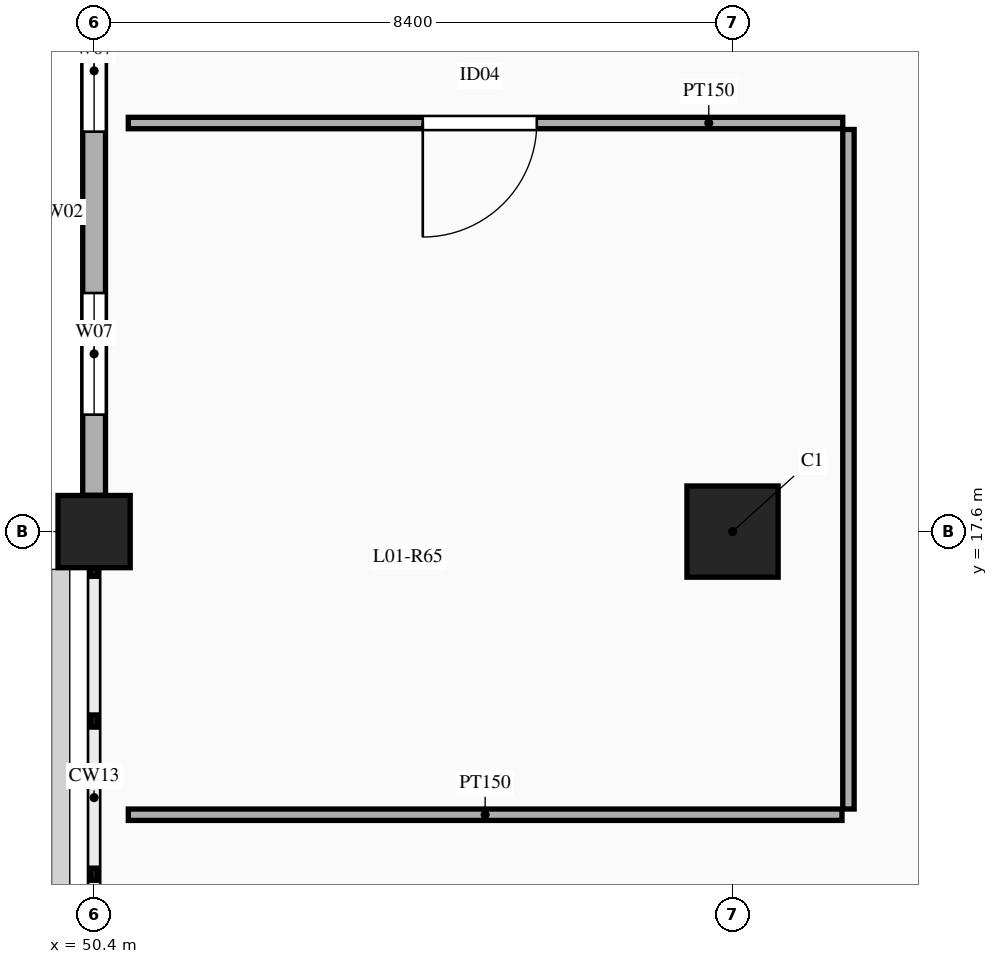
"""IFC4 building model, lengths in metres.
Left out: names, types, materials, properties, quantities, classifications, styles, units other than length and angle.
Written with IfcOpenShell. Run it as: python <this file> out.ifc"""

import sys

from ifc_helpers import new_model, si_unit, direction, frame, frame_2d, origin, origin_2d, place, context, subcontext, project, spatial, rectangle, extrude, element, fill, save


model = new_model("IFC4")
c1 = context("Model", 3, precision=1e-05, world=origin(), true_north=direction((0.0, 1.0)))
c2 = subcontext(c1, "Body", "Model", "MODEL_VIEW")
j1 = project(units=[si_unit("LENGTHUNIT", "METRE"), si_unit("PLANEANGLEUNIT", "RADIAN")], contexts=[c1])
p1 = place(None, origin())
s1 = spatial("IfcSite", under=j1, at=p1, CompositionType="ELEMENT")
p2 = place(p1, origin())
s2 = spatial("IfcBuilding", under=s1, at=p2, CompositionType="ELEMENT")
p3 = place(p2, frame((0.0, 0.0, 5.4)))
s3 = spatial("IfcBuildingStorey", under=s2, at=p3, CompositionType="ELEMENT", Elevation=5.4)
p4 = place(p3, frame((50.4, 17.6, 0.0), z_axis=(0.0, 0.0, 1.0), x_axis=(1.0, 0.0, 0.0)))
e1 = element("IfcColumn", 1, at=p4, inside=s3, PredefinedType="COLUMN", context=c2, shape_type="SweptSolid", body=[
    extrude(rectangle(XDim=0.95, YDim=0.95, at=origin_2d()), origin(), (0.0, 0.0, 1.0), 4.8),
])
p5 = place(p3, frame((58.8, 17.6, 0.0), z_axis=(0.0, 0.0, 1.0), x_axis=(1.0, 0.0, 0.0)))
e2 = element("IfcColumn", 2, at=p5, inside=s3, PredefinedType="COLUMN", context=c2, shape_type="SweptSolid", body=[
    extrude(rectangle(XDim=1.2, YDim=1.2, at=origin_2d()), origin(), (0.0, 0.0, 1.0), 4.8),
])
p6 = place(p3, frame((50.4, 18.077, 0.0), z_axis=(0.0, 0.0, 1.0), x_axis=(0.0, 1.0, 0.0)))
e3 = element("IfcWall", 3, at=p6, inside=s3, PredefinedType="SOLIDWALL", context=c2, shape_type="SweptSolid", body=[
    extrude(rectangle(XDim=7.446, YDim=0.3, at=frame_2d((3.723, 0.0))), origin(), (0.0, 0.0, 1.0), 3.85),
])
p7 = place(p6, frame((1.062, 0.0, 0.9)))
e4 = element("IfcOpeningElement", 4, at=p7, cuts=e3, PredefinedType="OPENING", context=c2, shape_type="SweptSolid", body=[
    extrude(rectangle(XDim=1.6, YDim=2.1, at=frame_2d((0.8, 1.05))), frame((0.0, 0.16, 0.0), z_axis=(0.0, -1.0, 0.0), x_axis=(1.0, 0.0, 0.0)), (0.0, 0.0, 1.0), 0.32),
])
p8 = place(p6, frame((4.784, 0.0, 0.9)))
e5 = element("IfcOpeningElement", 5, at=p8, cuts=e3, PredefinedType="OPENING", context=c2, shape_type="SweptSolid", body=[
    extrude(rectangle(XDim=1.6, YDim=2.1, at=frame_2d((0.8, 1.05))), frame((0.0, 0.16, 0.0), z_axis=(0.0, -1.0, 0.0), x_axis=(1.0, 0.0, 0.0)), (0.0, 0.0, 1.0), 0.32),
])
p9 = place(p3, frame((50.85, 22.975, 0.0), z_axis=(0.0, 0.0, 1.0), x_axis=(1.0, 0.0, 0.0)))
e6 = element("IfcWall", 6, at=p9, inside=s3, PredefinedType="PARTITIONING", context=c2, shape_type="SweptSolid", body=[
    extrude(rectangle(XDim=9.4, YDim=0.15, at=frame_2d((4.7, 0.0))), origin(), (0.0, 0.0, 1.0), 2.95),
])
p10 = place(p9, frame((3.875, 0.0, 0.0)))
e7 = element("IfcOpeningElement", 7, at=p10, cuts=e6, PredefinedType="OPENING", context=c2, shape_type="SweptSolid", body=[
    extrude(rectangle(XDim=1.5, YDim=2.3, at=frame_2d((0.75, 1.15))), frame((0.0, 0.085, 0.0), z_axis=(0.0, -1.0, 0.0), x_axis=(1.0, 0.0, 0.0)), (0.0, 0.0, 1.0), 0.17),
])
p11 = place(p3, frame((60.325, 13.95, 0.0), z_axis=(0.0, 0.0, 1.0), x_axis=(0.0, 1.0, 0.0)))
e8 = element("IfcWall", 8, at=p11, inside=s3, PredefinedType="PARTITIONING", context=c2, shape_type="SweptSolid", body=[
    extrude(rectangle(XDim=8.94, YDim=0.15, at=frame_2d((4.47, 0.0))), origin(), (0.0, 0.0, 1.0), 2.95),
])
p12 = place(p3, frame((50.85, 13.875, 0.0), z_axis=(0.0, 0.0, 1.0), x_axis=(1.0, 0.0, 0.0)))
e9 = element("IfcWall", 9, at=p12, inside=s3, PredefinedType="PARTITIONING", context=c2, shape_type="SweptSolid", body=[
    extrude(rectangle(XDim=9.39, YDim=0.15, at=frame_2d((4.695, 0.0))), origin(), (0.0, 0.0, 1.0), 2.95),
])
p13 = place(p7, origin())
e10 = element("IfcWindow", 10, at=p13, inside=s3, PartitioningType="DOUBLE_PANEL_VERTICAL", PredefinedType="WINDOW", context=c2, shape_type="SweptSolid", body=[
    extrude(rectangle(XDim=1.6, YDim=2.1, at=frame_2d((0.8, 1.05))), frame((0.0, 0.03, 0.0), z_axis=(0.0, -1.0, 0.0), x_axis=(1.0, 0.0, 0.0)), (0.0, 0.0, 1.0), 0.06),
])
fill(e4, e10)
p14 = place(p8, origin())
e11 = element("IfcWindow", 11, at=p14, inside=s3, PartitioningType="DOUBLE_PANEL_VERTICAL", PredefinedType="WINDOW", context=c2, shape_type="SweptSolid", body=[
    extrude(rectangle(XDim=1.6, YDim=2.1, at=frame_2d((0.8, 1.05))), frame((0.0, 0.03, 0.0), z_axis=(0.0, -1.0, 0.0), x_axis=(1.0, 0.0, 0.0)), (0.0, 0.0, 1.0), 0.06),
])
fill(e5, e11)
p15 = place(p10, frame((1.5, 0.0, 0.0), z_axis=(0.0, 0.0, 1.0), x_axis=(-1.0, 0.0, 0.0)))
e12 = element("IfcDoor", 12, at=p15, inside=s3, OperationType="SINGLE_SWING_RIGHT", PredefinedType="DOOR", context=c2, shape_type="SweptSolid", body=[
    extrude(rectangle(XDim=1.5, YDim=2.3, at=frame_2d((0.75, 1.15))), frame((0.0, 0.025, 0.0), z_axis=(0.0, -1.0, 0.0), x_axis=(1.0, 0.0, 0.0)), (0.0, 0.0, 1.0), 0.05),
])
fill(e7, e12)
save(model, sys.argv[1])
